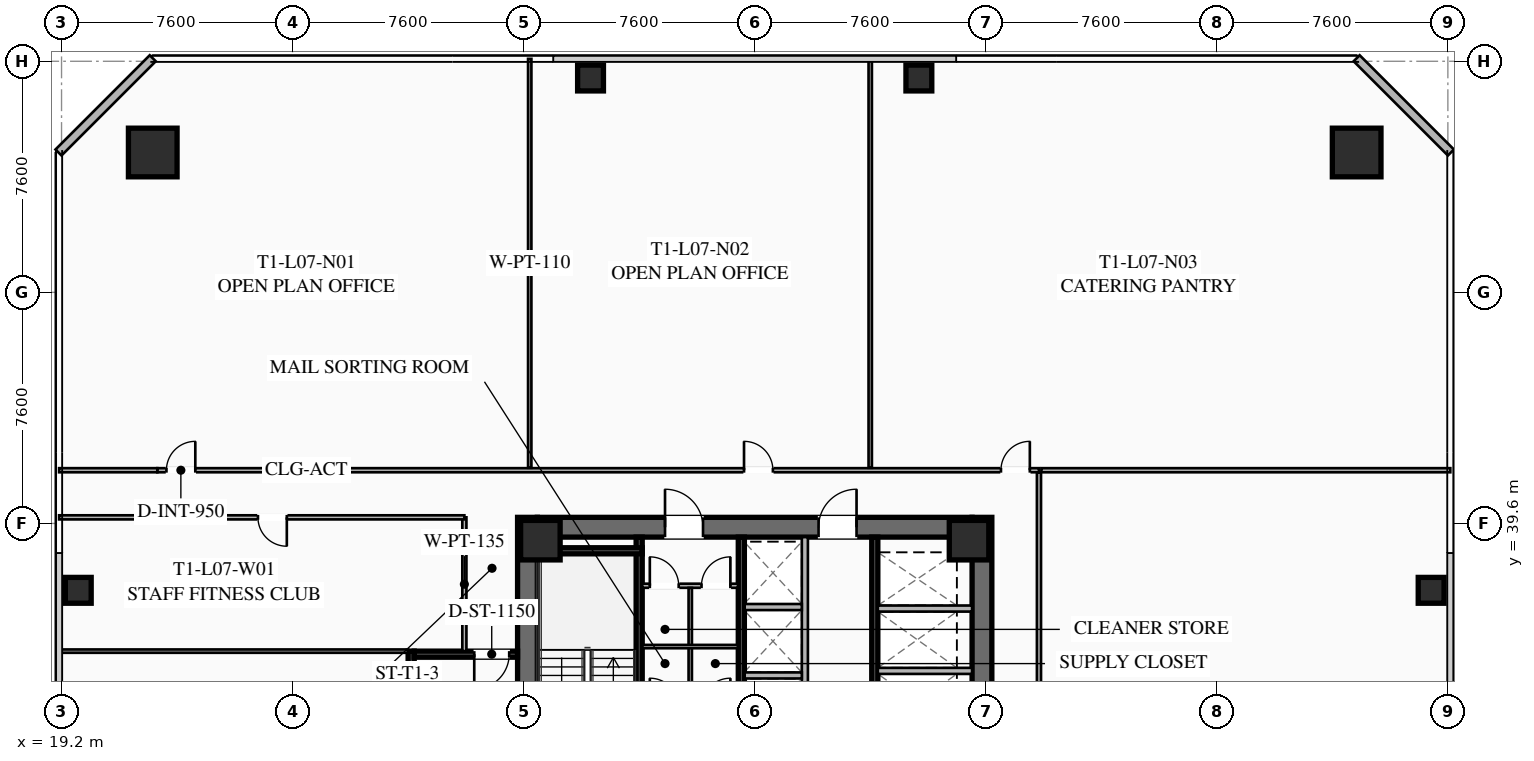
"""IFC4 building model, lengths in metres.
Left out: names, types, materials, properties, quantities, classifications, styles, units other than length and angle.
Written with IfcOpenShell. Run it as: python <this file> out.ifc"""

import sys

from ifc_helpers import new_model, si_unit, direction, frame, frame_2d, origin, origin_2d, place, context, subcontext, project, spatial, rectangle, hollow_rectangle, extrude, element, fill, save


model = new_model("IFC4")
c1 = context("Model", 3, precision=1e-05, world=origin(), true_north=direction((0.0, 1.0)))
c2 = subcontext(c1, "Body", "Model", "MODEL_VIEW")
j1 = project(units=[si_unit("LENGTHUNIT", "METRE"), si_unit("PLANEANGLEUNIT", "RADIAN")], contexts=[c1])
p1 = place(None, origin())
s1 = spatial("IfcSite", under=j1, at=p1, CompositionType="ELEMENT")
p2 = place(p1, origin())
s2 = spatial("IfcBuilding", under=s1, at=p2, CompositionType="ELEMENT")
p3 = place(p2, frame((0.0, 0.0, 31.7)))
s3 = spatial("IfcBuildingStorey", under=s2, at=p3, CompositionType="ELEMENT", Elevation=31.7)
for number, where, z_axis, x_axis in (
    (1, (34.525, 24.2, 0.0), (0.0, 0.0, 1.0), (0.0, 1.0, 0.0)),
    (2, (49.475, 39.8, 0.0), (0.0, 0.0, 1.0), (0.0, -1.0, 0.0)),
):
    element("IfcWall", number, at=place(p3, frame(where, z_axis=z_axis, x_axis=x_axis)), inside=s3, PredefinedType="SHEAR", context=c2, shape_type="SweptSolid", body=[
        extrude(rectangle(XDim=15.6, YDim=0.65, at=frame_2d((7.8, 0.0))), origin(), (0.0, 0.0, 1.0), 3.55),
    ])
p4 = place(p3, frame((34.85, 39.475, 0.0), z_axis=(0.0, 0.0, 1.0), x_axis=(1.0, 0.0, 0.0)))
e3 = element("IfcWall", 3, at=p4, inside=s3, PredefinedType="SHEAR", context=c2, shape_type="SweptSolid", body=[
    extrude(rectangle(XDim=14.3, YDim=0.65, at=frame_2d((7.15, 0.0))), origin(), (0.0, 0.0, 1.0), 3.55),
])
p5 = place(p4, frame((4.2, 0.0, 0.0)))
e4 = element("IfcOpeningElement", 4, at=p5, cuts=e3, PredefinedType="OPENING", context=c2, shape_type="SweptSolid", body=[
    extrude(rectangle(XDim=1.25, YDim=2.25, at=frame_2d((0.625, 1.125))), frame((0.0, 0.335, 0.0), z_axis=(0.0, -1.0, 0.0), x_axis=(1.0, 0.0, 0.0)), (0.0, 0.0, 1.0), 0.67),
])
p6 = place(p4, frame((9.25, 0.0, 0.0)))
e5 = element("IfcOpeningElement", 5, at=p6, cuts=e3, PredefinedType="OPENING", context=c2, shape_type="SweptSolid", body=[
    extrude(rectangle(XDim=1.25, YDim=2.25, at=frame_2d((0.625, 1.125))), frame((0.0, 0.335, 0.0), z_axis=(0.0, -1.0, 0.0), x_axis=(1.0, 0.0, 0.0)), (0.0, 0.0, 1.0), 0.67),
])
for number, where, z_axis, x_axis in (
    (6, (49.05, 39.05, 0.0), (0.0, 0.0, 1.0), (1.0, 0.0, 0.0)),
    (7, (34.95, 39.05, 0.0), (0.0, 0.0, 1.0), (1.0, 0.0, 0.0)),
):
    element("IfcColumn", number, at=place(p3, frame(where, z_axis=z_axis, x_axis=x_axis)), inside=s3, PredefinedType="COLUMN", context=c2, shape_type="SweptSolid", body=[
        extrude(hollow_rectangle(XDim=1.3, YDim=1.3, WallThickness=0.05, at=origin_2d()), origin(), (0.0, 0.0, 1.0), 3.35),
    ])
for number, where, z_axis, x_axis in (
    (8, (61.8, 51.8, 0.0), (0.0, 0.0, 1.0), (1.0, 0.0, 0.0)),
    (9, (22.2, 51.8, 0.0), (0.0, 0.0, 1.0), (1.0, 0.0, 0.0)),
):
    element("IfcColumn", number, at=place(p3, frame(where, z_axis=z_axis, x_axis=x_axis)), inside=s3, PredefinedType="COLUMN", context=c2, shape_type="SweptSolid", body=[
        extrude(hollow_rectangle(XDim=1.6, YDim=1.6, WallThickness=0.06, at=origin_2d()), origin(), (0.0, 0.0, 1.0), 3.35),
    ])
for number, where, z_axis, x_axis in (
    (10, (64.25, 37.4, 0.0), (0.0, 0.0, 1.0), (1.0, 0.0, 0.0)),
    (11, (47.4, 54.25, 0.0), (0.0, 0.0, 1.0), (1.0, 0.0, 0.0)),
    (12, (36.6, 54.25, 0.0), (0.0, 0.0, 1.0), (1.0, 0.0, 0.0)),
    (13, (19.75, 37.4, 0.0), (0.0, 0.0, 1.0), (1.0, 0.0, 0.0)),
):
    element("IfcColumn", number, at=place(p3, frame(where, z_axis=z_axis, x_axis=x_axis)), inside=s3, PredefinedType="COLUMN", context=c2, shape_type="SweptSolid", body=[
        extrude(hollow_rectangle(XDim=0.85, YDim=0.85, WallThickness=0.035, at=origin_2d()), origin(), (0.0, 0.0, 1.0), 3.35),
    ])
for number, where, z_axis, x_axis in (
    (14, (19.1, 51.8, 0.0), (0.0, 0.0, 1.0), (0.707, 0.707, 0.0)),
    (15, (61.8, 54.9, 0.0), (0.0, 0.0, 1.0), (0.707, -0.707, 0.0)),
):
    element("IfcWall", number, at=place(p3, frame(where, z_axis=z_axis, x_axis=x_axis)), inside=s3, PredefinedType="SOLIDWALL", context=c2, shape_type="SweptSolid", body=[
        extrude(rectangle(XDim=4.384, YDim=0.28, at=frame_2d((2.192, 0.0))), origin(), (0.0, 0.0, 1.0), 3.35),
    ])
p7 = place(p3, frame((38.2, 31.2, 0.0), z_axis=(0.0, 0.0, 1.0), x_axis=(0.0, 1.0, 0.0)))
e16 = element("IfcWall", 16, at=p7, inside=s3, PredefinedType="SHEAR", context=c2, shape_type="SweptSolid", body=[
    extrude(rectangle(XDim=7.95, YDim=0.2, at=frame_2d((3.975, 0.0))), origin(), (0.0, 0.0, 1.0), 3.35),
])
p8 = place(p7, frame((0.45, 0.0, 0.0)))
e17 = element("IfcOpeningElement", 17, at=p8, cuts=e16, PredefinedType="OPENING", context=c2, shape_type="SweptSolid", body=[
    extrude(rectangle(XDim=1.15, YDim=2.2, at=frame_2d((0.575, 1.1))), frame((0.0, 0.11, 0.0), z_axis=(0.0, -1.0, 0.0), x_axis=(1.0, 0.0, 0.0)), (0.0, 0.0, 1.0), 0.22),
])
p9 = place(p3, frame((34.85, 38.7, 0.0), z_axis=(0.0, 0.0, 1.0), x_axis=(1.0, 0.0, 0.0)))
e18 = element("IfcWall", 18, at=p9, inside=s3, PredefinedType="SHEAR", context=c2, shape_type="SweptSolid", body=[
    extrude(rectangle(XDim=3.45, YDim=0.2, at=frame_2d((1.725, 0.0))), origin(), (0.0, 0.0, 1.0), 3.35),
])
p10 = place(p3, frame((41.56, 24.85, 0.0), z_axis=(0.0, 0.0, 1.0), x_axis=(0.0, 1.0, 0.0)))
e19 = element("IfcWall", 19, at=p10, inside=s3, PredefinedType="SHEAR", context=c2, shape_type="SweptSolid", body=[
    extrude(rectangle(XDim=14.3, YDim=0.2, at=frame_2d((7.15, 0.0))), origin(), (0.0, 0.0, 1.0), 3.35),
])
p11 = place(p3, frame((45.95, 39.15, 0.0), z_axis=(0.0, 0.0, 1.0), x_axis=(0.0, -1.0, 0.0)))
e20 = element("IfcWall", 20, at=p11, inside=s3, PredefinedType="SHEAR", context=c2, shape_type="SweptSolid", body=[
    extrude(rectangle(XDim=6.35, YDim=0.2, at=frame_2d((3.175, 0.0))), origin(), (0.0, 0.0, 1.0), 3.35),
])
for number, where, z_axis, x_axis in (
    (21, (46.05, 34.75, 0.0), (0.0, 0.0, 1.0), (1.0, 0.0, 0.0)),
    (22, (46.05, 36.8, 0.0), (0.0, 0.0, 1.0), (1.0, 0.0, 0.0)),
):
    element("IfcWall", number, at=place(p3, frame(where, z_axis=z_axis, x_axis=x_axis)), inside=s3, PredefinedType="SOLIDWALL", context=c2, shape_type="SweptSolid", body=[
        extrude(rectangle(XDim=3.1, YDim=0.2, at=frame_2d((1.55, 0.0))), origin(), (0.0, 0.0, 1.0), 3.35),
    ])
p12 = place(p3, frame((38.3, 37.55, 0.0), z_axis=(0.0, 0.0, 1.0), x_axis=(1.0, 0.0, 0.0)))
e23 = element("IfcWall", 23, at=p12, inside=s3, PredefinedType="PARTITIONING", context=c2, shape_type="SweptSolid", body=[
    extrude(rectangle(XDim=3.15, YDim=0.135, at=frame_2d((1.575, 0.0))), origin(), (0.0, 0.0, 1.0), 2.703),
])
p13 = place(p12, frame((0.25, 0.0, 0.0)))
e24 = element("IfcOpeningElement", 24, at=p13, cuts=e23, PredefinedType="OPENING", context=c2, shape_type="SweptSolid", body=[
    extrude(rectangle(XDim=0.95, YDim=2.05, at=frame_2d((0.475, 1.025))), frame((0.0, 0.077, 0.0), z_axis=(0.0, -1.0, 0.0), x_axis=(1.0, 0.0, 0.0)), (0.0, 0.0, 1.0), 0.155),
])
p14 = place(p12, frame((1.95, 0.0, 0.0)))
e25 = element("IfcOpeningElement", 25, at=p14, cuts=e23, PredefinedType="OPENING", context=c2, shape_type="SweptSolid", body=[
    extrude(rectangle(XDim=0.95, YDim=2.05, at=frame_2d((0.475, 1.025))), frame((0.0, 0.077, 0.0), z_axis=(0.0, -1.0, 0.0), x_axis=(1.0, 0.0, 0.0)), (0.0, 0.0, 1.0), 0.155),
])
p15 = place(p3, frame((39.88, 33.68, 0.0), z_axis=(0.0, 0.0, 1.0), x_axis=(0.0, 1.0, 0.0)))
e26 = element("IfcWall", 26, at=p15, inside=s3, PredefinedType="PARTITIONING", context=c2, shape_type="SweptSolid", body=[
    extrude(rectangle(XDim=3.8, YDim=0.11, at=frame_2d((1.9, 0.0))), origin(), (0.0, 0.0, 1.0), 2.703),
])
p16 = place(p3, frame((38.3, 35.55, 0.0), z_axis=(0.0, 0.0, 1.0), x_axis=(1.0, 0.0, 0.0)))
e27 = element("IfcWall", 27, at=p16, inside=s3, PredefinedType="PARTITIONING", context=c2, shape_type="SweptSolid", body=[
    extrude(rectangle(XDim=3.15, YDim=0.11, at=frame_2d((1.575, 0.0))), origin(), (0.0, 0.0, 1.0), 2.703),
])
p17 = place(p3, frame((43.65, 32.35, 0.0), z_axis=(0.0, 0.0, 1.0), x_axis=(0.0, 1.0, 0.0)))
e28 = element("IfcWall", 28, at=p17, inside=s3, PredefinedType="SOLIDWALL", context=c2, shape_type="SweptSolid", body=[
    extrude(rectangle(XDim=6.8, YDim=0.2, at=frame_2d((3.4, 0.0))), origin(), (0.0, 0.0, 1.0), 3.35),
])
for number, where, z_axis, x_axis in (
    (29, (41.67, 34.6, 0.0), (0.0, 0.0, 1.0), (1.0, 0.0, 0.0)),
    (30, (41.67, 36.85, 0.0), (0.0, 0.0, 1.0), (1.0, 0.0, 0.0)),
):
    element("IfcWall", number, at=place(p3, frame(where, z_axis=z_axis, x_axis=x_axis)), inside=s3, PredefinedType="SOLIDWALL", context=c2, shape_type="SweptSolid", body=[
        extrude(rectangle(XDim=1.88, YDim=0.2, at=frame_2d((0.94, 0.0))), origin(), (0.0, 0.0, 1.0), 3.35),
    ])
p18 = place(p3, frame((30.7, 28.6, 0.0), z_axis=(0.0, 0.0, 1.0), x_axis=(0.0, 1.0, 0.0)))
e31 = element("IfcWall", 31, at=p18, inside=s3, PredefinedType="SHEAR", context=c2, shape_type="SweptSolid", body=[
    extrude(rectangle(XDim=6.8, YDim=0.2, at=frame_2d((3.4, 0.0))), origin(), (0.0, 0.0, 1.0), 3.35),
])
p19 = place(p3, frame((34.2, 35.3, 0.0), z_axis=(0.0, 0.0, 1.0), x_axis=(-1.0, 0.0, 0.0)))
e32 = element("IfcWall", 32, at=p19, inside=s3, PredefinedType="SHEAR", context=c2, shape_type="SweptSolid", body=[
    extrude(rectangle(XDim=3.4, YDim=0.2, at=frame_2d((1.7, 0.0))), origin(), (0.0, 0.0, 1.0), 3.35),
])
p20 = place(p19, frame((0.275, 0.0, 0.0)))
e33 = element("IfcOpeningElement", 33, at=p20, cuts=e32, PredefinedType="OPENING", context=c2, shape_type="SweptSolid", body=[
    extrude(rectangle(XDim=1.15, YDim=2.2, at=frame_2d((0.575, 1.1))), frame((0.0, 0.11, 0.0), z_axis=(0.0, -1.0, 0.0), x_axis=(1.0, 0.0, 0.0)), (0.0, 0.0, 1.0), 0.22),
])
p21 = place(p3, frame((32.45, 35.4, 0.0), z_axis=(0.0, 0.0, 1.0), x_axis=(0.0, 1.0, 0.0)))
e34 = element("IfcWall", 34, at=p21, inside=s3, PredefinedType="PARTITIONING", context=c2, shape_type="SweptSolid", body=[
    extrude(rectangle(XDim=4.4, YDim=0.135, at=frame_2d((2.2, 0.0))), origin(), (0.0, 0.0, 1.0), 2.703),
])
p22 = place(p3, frame((22.35, 41.35, 0.0), z_axis=(0.0, 0.0, 1.0), x_axis=(1.0, 0.0, 0.0)))
e35 = element("IfcWall", 35, at=p22, inside=s3, PredefinedType="PARTITIONING", context=c2, shape_type="SweptSolid", body=[
    extrude(rectangle(XDim=29.0, YDim=0.135, at=frame_2d((14.5, 0.0))), origin(), (0.0, 0.0, 1.0), 2.703),
])
p23 = place(p22, frame((0.3, 0.0, 0.0)))
e36 = element("IfcOpeningElement", 36, at=p23, cuts=e35, PredefinedType="OPENING", context=c2, shape_type="SweptSolid", body=[
    extrude(rectangle(XDim=0.95, YDim=2.05, at=frame_2d((0.475, 1.025))), frame((0.0, 0.077, 0.0), z_axis=(0.0, -1.0, 0.0), x_axis=(1.0, 0.0, 0.0)), (0.0, 0.0, 1.0), 0.155),
])
p24 = place(p22, frame((19.299, 0.0, 0.0)))
e37 = element("IfcOpeningElement", 37, at=p24, cuts=e35, PredefinedType="OPENING", context=c2, shape_type="SweptSolid", body=[
    extrude(rectangle(XDim=0.95, YDim=2.05, at=frame_2d((0.475, 1.025))), frame((0.0, 0.077, 0.0), z_axis=(0.0, -1.0, 0.0), x_axis=(1.0, 0.0, 0.0)), (0.0, 0.0, 1.0), 0.155),
])
p25 = place(p22, frame((27.75, 0.0, 0.0)))
e38 = element("IfcOpeningElement", 38, at=p25, cuts=e35, PredefinedType="OPENING", context=c2, shape_type="SweptSolid", body=[
    extrude(rectangle(XDim=0.95, YDim=2.05, at=frame_2d((0.475, 1.025))), frame((0.0, 0.077, 0.0), z_axis=(0.0, -1.0, 0.0), x_axis=(1.0, 0.0, 0.0)), (0.0, 0.0, 1.0), 0.155),
])
p26 = place(p3, frame((19.12, 41.35, 0.0), z_axis=(0.0, 0.0, 1.0), x_axis=(1.0, 0.0, 0.0)))
e39 = element("IfcWall", 39, at=p26, inside=s3, PredefinedType="PARTITIONING", context=c2, shape_type="SweptSolid", body=[
    extrude(rectangle(XDim=3.23, YDim=0.135, at=frame_2d((1.615, 0.0))), origin(), (0.0, 0.0, 1.0), 2.703),
])
for number, where, z_axis, x_axis in (
    (40, (34.6, 41.43, 0.0), (0.0, 0.0, 1.0), (0.0, 1.0, 0.0)),
    (41, (45.8, 41.43, 0.0), (0.0, 0.0, 1.0), (0.0, 1.0, 0.0)),
):
    element("IfcWall", number, at=place(p3, frame(where, z_axis=z_axis, x_axis=x_axis)), inside=s3, PredefinedType="PARTITIONING", context=c2, shape_type="SweptSolid", body=[
        extrude(rectangle(XDim=13.45, YDim=0.11, at=frame_2d((6.725, 0.0))), origin(), (0.0, 0.0, 1.0), 2.703),
    ])
p27 = place(p3, frame((51.35, 41.27, 0.0), z_axis=(0.0, 0.0, 1.0), x_axis=(0.0, -1.0, 0.0)))
e42 = element("IfcWall", 42, at=p27, inside=s3, PredefinedType="PARTITIONING", context=c2, shape_type="SweptSolid", body=[
    extrude(rectangle(XDim=18.86, YDim=0.135, at=frame_2d((9.43, 0.0))), origin(), (0.0, 0.0, 1.0), 2.703),
])
p28 = place(p27, frame((8.579, 0.0, 0.0)))
e43 = element("IfcOpeningElement", 43, at=p28, cuts=e42, PredefinedType="OPENING", context=c2, shape_type="SweptSolid", body=[
    extrude(rectangle(XDim=0.95, YDim=2.05, at=frame_2d((0.475, 1.025))), frame((0.0, 0.077, 0.0), z_axis=(0.0, -1.0, 0.0), x_axis=(1.0, 0.0, 0.0)), (0.0, 0.0, 1.0), 0.155),
])
p29 = place(p3, frame((64.88, 41.35, 0.0), z_axis=(0.0, 0.0, 1.0), x_axis=(-1.0, 0.0, 0.0)))
e44 = element("IfcWall", 44, at=p29, inside=s3, PredefinedType="PARTITIONING", context=c2, shape_type="SweptSolid", body=[
    extrude(rectangle(XDim=13.45, YDim=0.135, at=frame_2d((6.725, 0.0))), origin(), (0.0, 0.0, 1.0), 2.703),
])
p30 = place(p3, frame((32.45, 39.8, 0.0), z_axis=(0.0, 0.0, 1.0), x_axis=(-1.0, 0.0, 0.0)))
e45 = element("IfcWall", 45, at=p30, inside=s3, PredefinedType="PARTITIONING", context=c2, shape_type="SweptSolid", body=[
    extrude(rectangle(XDim=13.33, YDim=0.135, at=frame_2d((6.665, 0.0))), origin(), (0.0, 0.0, 1.0), 2.703),
])
p31 = place(p30, frame((5.84, 0.0, 0.0)))
e46 = element("IfcOpeningElement", 46, at=p31, cuts=e45, PredefinedType="OPENING", context=c2, shape_type="SweptSolid", body=[
    extrude(rectangle(XDim=0.95, YDim=2.05, at=frame_2d((0.475, 1.025))), frame((0.0, 0.077, 0.0), z_axis=(0.0, -1.0, 0.0), x_axis=(1.0, 0.0, 0.0)), (0.0, 0.0, 1.0), 0.155),
])
p32 = place(p3, frame((30.6, 35.4, 0.0), z_axis=(0.0, 0.0, 1.0), x_axis=(-1.0, 0.0, 0.0)))
e47 = element("IfcWall", 47, at=p32, inside=s3, PredefinedType="PARTITIONING", context=c2, shape_type="SweptSolid", body=[
    extrude(rectangle(XDim=11.48, YDim=0.11, at=frame_2d((5.74, 0.0))), origin(), (0.0, 0.0, 1.0), 2.703),
])
p33 = place(p5, origin())
e48 = element("IfcDoor", 48, at=p33, inside=s3, OperationType="SINGLE_SWING_LEFT", PredefinedType="DOOR", context=c2, shape_type="SweptSolid", body=[
    extrude(rectangle(XDim=1.25, YDim=2.25, at=frame_2d((0.625, 1.125))), frame((0.0, 0.025, 0.0), z_axis=(0.0, -1.0, 0.0), x_axis=(1.0, 0.0, 0.0)), (0.0, 0.0, 1.0), 0.05),
])
fill(e4, e48)
p34 = place(p6, origin())
e49 = element("IfcDoor", 49, at=p34, inside=s3, OperationType="SINGLE_SWING_RIGHT", PredefinedType="DOOR", context=c2, shape_type="SweptSolid", body=[
    extrude(rectangle(XDim=1.25, YDim=2.25, at=frame_2d((0.625, 1.125))), frame((0.0, 0.025, 0.0), z_axis=(0.0, -1.0, 0.0), x_axis=(1.0, 0.0, 0.0)), (0.0, 0.0, 1.0), 0.05),
])
fill(e5, e49)
p35 = place(p13, origin())
e50 = element("IfcDoor", 50, at=p35, inside=s3, OperationType="SINGLE_SWING_LEFT", PredefinedType="DOOR", context=c2, shape_type="SweptSolid", body=[
    extrude(rectangle(XDim=0.95, YDim=2.05, at=frame_2d((0.475, 1.025))), frame((0.0, 0.025, 0.0), z_axis=(0.0, -1.0, 0.0), x_axis=(1.0, 0.0, 0.0)), (0.0, 0.0, 1.0), 0.05),
])
fill(e24, e50)
p36 = place(p14, origin())
e51 = element("IfcDoor", 51, at=p36, inside=s3, OperationType="SINGLE_SWING_RIGHT", PredefinedType="DOOR", context=c2, shape_type="SweptSolid", body=[
    extrude(rectangle(XDim=0.95, YDim=2.05, at=frame_2d((0.475, 1.025))), frame((0.0, 0.025, 0.0), z_axis=(0.0, -1.0, 0.0), x_axis=(1.0, 0.0, 0.0)), (0.0, 0.0, 1.0), 0.05),
])
fill(e25, e51)
p37 = place(p20, origin())
e52 = element("IfcDoor", 52, at=p37, inside=s3, OperationType="SINGLE_SWING_RIGHT", PredefinedType="DOOR", context=c2, shape_type="SweptSolid", body=[
    extrude(rectangle(XDim=1.15, YDim=2.2, at=frame_2d((0.575, 1.1))), frame((0.0, 0.025, 0.0), z_axis=(0.0, -1.0, 0.0), x_axis=(1.0, 0.0, 0.0)), (0.0, 0.0, 1.0), 0.05),
])
fill(e33, e52)
p38 = place(p23, origin())
e53 = element("IfcDoor", 53, at=p38, inside=s3, OperationType="SINGLE_SWING_RIGHT", PredefinedType="DOOR", context=c2, shape_type="SweptSolid", body=[
    extrude(rectangle(XDim=0.95, YDim=2.05, at=frame_2d((0.475, 1.025))), frame((0.0, 0.025, 0.0), z_axis=(0.0, -1.0, 0.0), x_axis=(1.0, 0.0, 0.0)), (0.0, 0.0, 1.0), 0.05),
])
fill(e36, e53)
p39 = place(p24, origin())
e54 = element("IfcDoor", 54, at=p39, inside=s3, OperationType="SINGLE_SWING_LEFT", PredefinedType="DOOR", context=c2, shape_type="SweptSolid", body=[
    extrude(rectangle(XDim=0.95, YDim=2.05, at=frame_2d((0.475, 1.025))), frame((0.0, 0.025, 0.0), z_axis=(0.0, -1.0, 0.0), x_axis=(1.0, 0.0, 0.0)), (0.0, 0.0, 1.0), 0.05),
])
fill(e37, e54)
p40 = place(p25, origin())
e55 = element("IfcDoor", 55, at=p40, inside=s3, OperationType="SINGLE_SWING_RIGHT", PredefinedType="DOOR", context=c2, shape_type="SweptSolid", body=[
    extrude(rectangle(XDim=0.95, YDim=2.05, at=frame_2d((0.475, 1.025))), frame((0.0, 0.025, 0.0), z_axis=(0.0, -1.0, 0.0), x_axis=(1.0, 0.0, 0.0)), (0.0, 0.0, 1.0), 0.05),
])
fill(e38, e55)
p41 = place(p31, origin())
e56 = element("IfcDoor", 56, at=p41, inside=s3, OperationType="SINGLE_SWING_LEFT", PredefinedType="DOOR", context=c2, shape_type="SweptSolid", body=[
    extrude(rectangle(XDim=0.95, YDim=2.05, at=frame_2d((0.475, 1.025))), frame((0.0, 0.025, 0.0), z_axis=(0.0, -1.0, 0.0), x_axis=(1.0, 0.0, 0.0)), (0.0, 0.0, 1.0), 0.05),
])
fill(e46, e56)
save(model, sys.argv[1])
